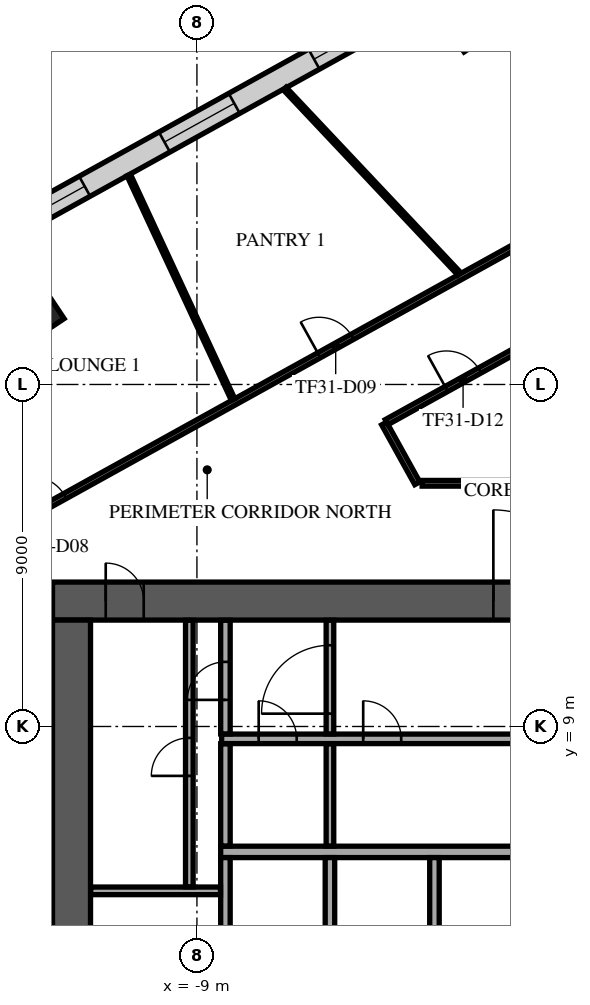
"""IFC4 building model, lengths in metres.
Left out: names, types, materials, properties, quantities, classifications, styles, units other than length and angle.
Written with IfcOpenShell. Run it as: python <this file> out.ifc"""

import sys

from ifc_helpers import new_model, si_unit, direction, frame, frame_2d, origin, origin_2d, place, context, subcontext, project, spatial, rectangle, extrude, element, fill, save


model = new_model("IFC4")
c1 = context("Model", 3, precision=1e-05, world=origin(), true_north=direction((0.0, 1.0)))
c2 = subcontext(c1, "Body", "Model", "MODEL_VIEW")
j1 = project(units=[si_unit("LENGTHUNIT", "METRE"), si_unit("PLANEANGLEUNIT", "RADIAN")], contexts=[c1])
p1 = place(None, origin())
s1 = spatial("IfcSite", under=j1, at=p1, CompositionType="ELEMENT")
p2 = place(p1, origin())
s2 = spatial("IfcBuilding", under=s1, at=p2, CompositionType="ELEMENT")
p3 = place(p2, frame((0.0, 0.0, 135.7)))
s3 = spatial("IfcBuildingStorey", under=s2, at=p3, CompositionType="ELEMENT", Elevation=135.7)
p4 = place(p3, frame((-13.258, 19.885, -0.4), z_axis=(0.0, 0.0, 1.0), x_axis=(0.832028680356, 0.55473261583, 0.0)))
e1 = element("IfcColumn", 1, at=p4, inside=s3, PredefinedType="COLUMN", context=c2, shape_type="SweptSolid", body=[
    extrude(rectangle(XDim=1.1, YDim=1.1, at=origin_2d()), origin(), (0.0, 0.0, 1.0), 4.4),
])
p5 = place(p3, frame((-12.8, 12.3, 0.0), z_axis=(0.0, 0.0, 1.0), x_axis=(1.0, 0.0, 0.0)))
e2 = element("IfcWall", 2, at=p5, inside=s3, PredefinedType="SHEAR", context=c2, shape_type="SweptSolid", body=[
    extrude(rectangle(XDim=25.6, YDim=1.0, at=frame_2d((12.8, 0.0))), origin(), (0.0, 0.0, 1.0), 3.6),
])
p6 = place(p5, frame((11.6, 0.0, 0.0)))
e3 = element("IfcOpeningElement", 3, at=p6, cuts=e2, PredefinedType="OPENING", context=c2, shape_type="SweptSolid", body=[
    extrude(rectangle(XDim=2.4, YDim=2.4, at=frame_2d((1.2, 1.2))), frame((0.0, 0.51, 0.0), z_axis=(0.0, -1.0, 0.0), x_axis=(1.0, 0.0, 0.0)), (0.0, 0.0, 1.0), 1.02),
])
p7 = place(p5, frame((22.425, 0.0, 0.0)))
e4 = element("IfcOpeningElement", 4, at=p7, cuts=e2, PredefinedType="OPENING", context=c2, shape_type="SweptSolid", body=[
    extrude(rectangle(XDim=1.2, YDim=2.1, at=frame_2d((0.6, 1.05))), frame((0.0, 0.51, 0.0), z_axis=(0.0, -1.0, 0.0), x_axis=(1.0, 0.0, 0.0)), (0.0, 0.0, 1.0), 1.02),
])
p8 = place(p5, frame((1.4, 0.0, 0.0)))
e5 = element("IfcOpeningElement", 5, at=p8, cuts=e2, PredefinedType="OPENING", context=c2, shape_type="SweptSolid", body=[
    extrude(rectangle(XDim=1.0, YDim=2.1, at=frame_2d((0.5, 1.05))), frame((0.0, 0.51, 0.0), z_axis=(0.0, -1.0, 0.0), x_axis=(1.0, 0.0, 0.0)), (0.0, 0.0, 1.0), 1.02),
])
p9 = place(p3, frame((-12.3, -11.8, 0.0), z_axis=(0.0, 0.0, 1.0), x_axis=(0.0, 1.0, 0.0)))
e6 = element("IfcWall", 6, at=p9, inside=s3, PredefinedType="SHEAR", context=c2, shape_type="SweptSolid", body=[
    extrude(rectangle(XDim=23.6, YDim=1.0, at=frame_2d((11.8, 0.0))), origin(), (0.0, 0.0, 1.0), 3.6),
])
p10 = place(p9, frame((10.6, 0.0, 0.0)))
e7 = element("IfcOpeningElement", 7, at=p10, cuts=e6, PredefinedType="OPENING", context=c2, shape_type="SweptSolid", body=[
    extrude(rectangle(XDim=2.4, YDim=2.4, at=frame_2d((1.2, 1.2))), frame((0.0, 0.51, 0.0), z_axis=(0.0, -1.0, 0.0), x_axis=(1.0, 0.0, 0.0)), (0.0, 0.0, 1.0), 1.02),
])
p11 = place(p3, frame((-8.375, 5.7, 0.0), z_axis=(0.0, 0.0, 1.0), x_axis=(1.0, 0.0, 0.0)))
e8 = element("IfcWall", 8, at=p11, inside=s3, PredefinedType="SOLIDWALL", context=c2, shape_type="SweptSolid", body=[
    extrude(rectangle(XDim=16.75, YDim=0.3, at=frame_2d((8.375, 0.0))), origin(), (0.0, 0.0, 1.0), 3.6),
])
for number, where, z_axis, x_axis in (
    (9, (-8.25, 2.85, 0.0), (0.0, 0.0, 1.0), (0.0, 1.0, 0.0)),
    (10, (-5.5, 2.85, 0.0), (0.0, 0.0, 1.0), (0.0, 1.0, 0.0)),
    (11, (-2.75, 2.85, 0.0), (0.0, 0.0, 1.0), (0.0, 1.0, 0.0)),
):
    element("IfcWall", number, at=place(p3, frame(where, z_axis=z_axis, x_axis=x_axis)), inside=s3, PredefinedType="SOLIDWALL", context=c2, shape_type="SweptSolid", body=[
        extrude(rectangle(XDim=2.7, YDim=0.25, at=frame_2d((1.35, 0.0))), origin(), (0.0, 0.0, 1.0), 3.6),
    ])
p12 = place(p3, frame((-11.795, 4.675, 0.0), z_axis=(0.0, 0.0, 1.0), x_axis=(1.0, 0.0, 0.0)))
e12 = element("IfcWall", 12, at=p12, inside=s3, PredefinedType="PARTITIONING", context=c2, shape_type="SweptSolid", body=[
    extrude(rectangle(XDim=3.415, YDim=0.2, at=frame_2d((1.708, 0.0))), origin(), (0.0, 0.0, 1.0), 3.6),
])
p13 = place(p3, frame((-9.2, 4.78, 0.0), z_axis=(0.0, 0.0, 1.0), x_axis=(0.0, 1.0, 0.0)))
e13 = element("IfcWall", 13, at=p13, inside=s3, PredefinedType="PARTITIONING", context=c2, shape_type="SweptSolid", body=[
    extrude(rectangle(XDim=7.015, YDim=0.2, at=frame_2d((3.507, 0.0))), origin(), (0.0, 0.0, 1.0), 3.6),
])
p14 = place(p13, frame((2.92, 0.0, 0.0)))
e14 = element("IfcOpeningElement", 14, at=p14, cuts=e13, PredefinedType="OPENING", context=c2, shape_type="SweptSolid", body=[
    extrude(rectangle(XDim=1.0, YDim=2.1, at=frame_2d((0.5, 1.05))), frame((0.0, 0.11, 0.0), z_axis=(0.0, -1.0, 0.0), x_axis=(1.0, 0.0, 0.0)), (0.0, 0.0, 1.0), 0.22),
])
p15 = place(p3, frame((-8.25, 5.855, 0.0), z_axis=(0.0, 0.0, 1.0), x_axis=(0.0, 1.0, 0.0)))
e15 = element("IfcWall", 15, at=p15, inside=s3, PredefinedType="PARTITIONING", context=c2, shape_type="SweptSolid", body=[
    extrude(rectangle(XDim=2.69, YDim=0.25, at=frame_2d((1.345, 0.0))), origin(), (0.0, 0.0, 1.0), 3.6),
])
p16 = place(p3, frame((-5.5, 5.855, 0.0), z_axis=(0.0, 0.0, 1.0), x_axis=(0.0, 1.0, 0.0)))
e16 = element("IfcWall", 16, at=p16, inside=s3, PredefinedType="PARTITIONING", context=c2, shape_type="SweptSolid", body=[
    extrude(rectangle(XDim=2.69, YDim=0.2, at=frame_2d((1.345, 0.0))), origin(), (0.0, 0.0, 1.0), 3.6),
])
p17 = place(p3, frame((-8.35, 8.675, 0.0), z_axis=(0.0, 0.0, 1.0), x_axis=(1.0, 0.0, 0.0)))
e17 = element("IfcWall", 17, at=p17, inside=s3, PredefinedType="PARTITIONING", context=c2, shape_type="SweptSolid", body=[
    extrude(rectangle(XDim=16.72, YDim=0.25, at=frame_2d((8.36, 0.0))), origin(), (0.0, 0.0, 1.0), 3.6),
])
p18 = place(p17, frame((0.975, 0.0, 0.0)))
e18 = element("IfcOpeningElement", 18, at=p18, cuts=e17, PredefinedType="OPENING", context=c2, shape_type="SweptSolid", body=[
    extrude(rectangle(XDim=1.0, YDim=2.1, at=frame_2d((0.5, 1.05))), frame((0.0, 0.135, 0.0), z_axis=(0.0, -1.0, 0.0), x_axis=(1.0, 0.0, 0.0)), (0.0, 0.0, 1.0), 0.27),
])
p19 = place(p17, frame((3.725, 0.0, 0.0)))
e19 = element("IfcOpeningElement", 19, at=p19, cuts=e17, PredefinedType="OPENING", context=c2, shape_type="SweptSolid", body=[
    extrude(rectangle(XDim=1.0, YDim=2.1, at=frame_2d((0.5, 1.05))), frame((0.0, 0.135, 0.0), z_axis=(0.0, -1.0, 0.0), x_axis=(1.0, 0.0, 0.0)), (0.0, 0.0, 1.0), 0.27),
])
p20 = place(p17, frame((9.125, 0.0, 0.0)))
e20 = element("IfcOpeningElement", 20, at=p20, cuts=e17, PredefinedType="OPENING", context=c2, shape_type="SweptSolid", body=[
    extrude(rectangle(XDim=1.2, YDim=2.1, at=frame_2d((0.6, 1.05))), frame((0.0, 0.135, 0.0), z_axis=(0.0, -1.0, 0.0), x_axis=(1.0, 0.0, 0.0)), (0.0, 0.0, 1.0), 0.27),
])
p21 = place(p3, frame((-8.25, 8.805, 0.0), z_axis=(0.0, 0.0, 1.0), x_axis=(0.0, 1.0, 0.0)))
e21 = element("IfcWall", 21, at=p21, inside=s3, PredefinedType="PARTITIONING", context=c2, shape_type="SweptSolid", body=[
    extrude(rectangle(XDim=2.99, YDim=0.25, at=frame_2d((1.495, 0.0))), origin(), (0.0, 0.0, 1.0), 3.6),
])
p22 = place(p21, frame((0.895, 0.0, 0.0)))
e22 = element("IfcOpeningElement", 22, at=p22, cuts=e21, PredefinedType="OPENING", context=c2, shape_type="SweptSolid", body=[
    extrude(rectangle(XDim=1.0, YDim=2.1, at=frame_2d((0.5, 1.05))), frame((0.0, 0.135, 0.0), z_axis=(0.0, -1.0, 0.0), x_axis=(1.0, 0.0, 0.0)), (0.0, 0.0, 1.0), 0.27),
])
p23 = place(p3, frame((-5.5, 8.805, 0.0), z_axis=(0.0, 0.0, 1.0), x_axis=(0.0, 1.0, 0.0)))
e23 = element("IfcWall", 23, at=p23, inside=s3, PredefinedType="PARTITIONING", context=c2, shape_type="SweptSolid", body=[
    extrude(rectangle(XDim=2.99, YDim=0.2, at=frame_2d((1.495, 0.0))), origin(), (0.0, 0.0, 1.0), 3.6),
])
p24 = place(p23, frame((0.532, 0.0, 0.0)))
e24 = element("IfcOpeningElement", 24, at=p24, cuts=e23, PredefinedType="OPENING", context=c2, shape_type="SweptSolid", body=[
    extrude(rectangle(XDim=1.8, YDim=2.1, at=frame_2d((0.9, 1.05))), frame((0.0, 0.11, 0.0), z_axis=(0.0, -1.0, 0.0), x_axis=(1.0, 0.0, 0.0)), (0.0, 0.0, 1.0), 0.22),
])
p25 = place(p3, frame((8.775, 34.705, 0.0), z_axis=(0.0, 0.0, 1.0), x_axis=(-0.874620778241, -0.484807687922, 0.0)))
e25 = element("IfcWall", 25, at=p25, inside=s3, PredefinedType="STANDARD", context=c2, shape_type="SweptSolid", body=[
    extrude(rectangle(XDim=49.376, YDim=0.6, at=frame_2d((24.688, 0.0))), origin(), (0.0, 0.0, 1.0), 3.6),
])
p26 = place(p25, frame((1.2, 0.0, 0.9)))
e26 = element("IfcOpeningElement", 26, at=p26, cuts=e25, PredefinedType="OPENING", context=c2, shape_type="SweptSolid", body=[
    extrude(rectangle(XDim=2.1, YDim=2.1, at=frame_2d((1.05, 1.05))), frame((0.0, 0.31, 0.0), z_axis=(0.0, -1.0, 0.0), x_axis=(1.0, 0.0, 0.0)), (0.0, 0.0, 1.0), 0.62),
])
p27 = place(p25, frame((5.7, 0.0, 0.9)))
e27 = element("IfcOpeningElement", 27, at=p27, cuts=e25, PredefinedType="OPENING", context=c2, shape_type="SweptSolid", body=[
    extrude(rectangle(XDim=2.1, YDim=2.1, at=frame_2d((1.05, 1.05))), frame((0.0, 0.31, 0.0), z_axis=(0.0, -1.0, 0.0), x_axis=(1.0, 0.0, 0.0)), (0.0, 0.0, 1.0), 0.62),
])
p28 = place(p25, frame((14.7, 0.0, 0.9)))
e28 = element("IfcOpeningElement", 28, at=p28, cuts=e25, PredefinedType="OPENING", context=c2, shape_type="SweptSolid", body=[
    extrude(rectangle(XDim=2.1, YDim=2.1, at=frame_2d((1.05, 1.05))), frame((0.0, 0.31, 0.0), z_axis=(0.0, -1.0, 0.0), x_axis=(1.0, 0.0, 0.0)), (0.0, 0.0, 1.0), 0.62),
])
p29 = place(p25, frame((19.2, 0.0, 0.9)))
e29 = element("IfcOpeningElement", 29, at=p29, cuts=e25, PredefinedType="OPENING", context=c2, shape_type="SweptSolid", body=[
    extrude(rectangle(XDim=2.1, YDim=2.1, at=frame_2d((1.05, 1.05))), frame((0.0, 0.31, 0.0), z_axis=(0.0, -1.0, 0.0), x_axis=(1.0, 0.0, 0.0)), (0.0, 0.0, 1.0), 0.62),
])
p30 = place(p25, frame((23.7, 0.0, 0.9)))
e30 = element("IfcOpeningElement", 30, at=p30, cuts=e25, PredefinedType="OPENING", context=c2, shape_type="SweptSolid", body=[
    extrude(rectangle(XDim=2.1, YDim=2.1, at=frame_2d((1.05, 1.05))), frame((0.0, 0.31, 0.0), z_axis=(0.0, -1.0, 0.0), x_axis=(1.0, 0.0, 0.0)), (0.0, 0.0, 1.0), 0.62),
])
p31 = place(p25, frame((28.2, 0.0, 0.9)))
e31 = element("IfcOpeningElement", 31, at=p31, cuts=e25, PredefinedType="OPENING", context=c2, shape_type="SweptSolid", body=[
    extrude(rectangle(XDim=2.1, YDim=2.1, at=frame_2d((1.05, 1.05))), frame((0.0, 0.31, 0.0), z_axis=(0.0, -1.0, 0.0), x_axis=(1.0, 0.0, 0.0)), (0.0, 0.0, 1.0), 0.62),
])
p32 = place(p25, frame((32.7, 0.0, 0.9)))
e32 = element("IfcOpeningElement", 32, at=p32, cuts=e25, PredefinedType="OPENING", context=c2, shape_type="SweptSolid", body=[
    extrude(rectangle(XDim=2.1, YDim=2.1, at=frame_2d((1.05, 1.05))), frame((0.0, 0.31, 0.0), z_axis=(0.0, -1.0, 0.0), x_axis=(1.0, 0.0, 0.0)), (0.0, 0.0, 1.0), 0.62),
])
p33 = place(p25, frame((37.2, 0.0, 0.9)))
e33 = element("IfcOpeningElement", 33, at=p33, cuts=e25, PredefinedType="OPENING", context=c2, shape_type="SweptSolid", body=[
    extrude(rectangle(XDim=2.1, YDim=2.1, at=frame_2d((1.05, 1.05))), frame((0.0, 0.31, 0.0), z_axis=(0.0, -1.0, 0.0), x_axis=(1.0, 0.0, 0.0)), (0.0, 0.0, 1.0), 0.62),
])
p34 = place(p25, frame((41.7, 0.0, 0.9)))
e34 = element("IfcOpeningElement", 34, at=p34, cuts=e25, PredefinedType="OPENING", context=c2, shape_type="SweptSolid", body=[
    extrude(rectangle(XDim=2.1, YDim=2.1, at=frame_2d((1.05, 1.05))), frame((0.0, 0.31, 0.0), z_axis=(0.0, -1.0, 0.0), x_axis=(1.0, 0.0, 0.0)), (0.0, 0.0, 1.0), 0.62),
])
p35 = place(p25, frame((46.138, 0.0, 0.9)))
e35 = element("IfcOpeningElement", 35, at=p35, cuts=e25, PredefinedType="OPENING", context=c2, shape_type="SweptSolid", body=[
    extrude(rectangle(XDim=2.1, YDim=2.1, at=frame_2d((1.05, 1.05))), frame((0.0, 0.31, 0.0), z_axis=(0.0, -1.0, 0.0), x_axis=(1.0, 0.0, 0.0)), (0.0, 0.0, 1.0), 0.62),
])
p36 = place(p3, frame((-23.187, 9.123, 0.0), z_axis=(0.0, 0.0, 1.0), x_axis=(0.874618419846, 0.484811942578, 0.0)))
e36 = element("IfcWall", 36, at=p36, inside=s3, PredefinedType="PARTITIONING", context=c2, shape_type="SweptSolid", body=[
    extrude(rectangle(XDim=31.713, YDim=0.15, at=frame_2d((15.857, 0.0))), origin(), (0.0, 0.0, 1.0), 3.15),
])
p37 = place(p36, frame((11.252, 0.0, 0.0)))
e37 = element("IfcOpeningElement", 37, at=p37, cuts=e36, PredefinedType="OPENING", context=c2, shape_type="SweptSolid", body=[
    extrude(rectangle(XDim=1.0, YDim=2.1, at=frame_2d((0.5, 1.05))), frame((0.0, 0.085, 0.0), z_axis=(0.0, -1.0, 0.0), x_axis=(1.0, 0.0, 0.0)), (0.0, 0.0, 1.0), 0.17),
])
p38 = place(p36, frame((19.896, 0.0, 0.0)))
e38 = element("IfcOpeningElement", 38, at=p38, cuts=e36, PredefinedType="OPENING", context=c2, shape_type="SweptSolid", body=[
    extrude(rectangle(XDim=1.0, YDim=2.1, at=frame_2d((0.5, 1.05))), frame((0.0, 0.085, 0.0), z_axis=(0.0, -1.0, 0.0), x_axis=(1.0, 0.0, 0.0)), (0.0, 0.0, 1.0), 0.17),
])
p39 = place(p36, frame((29.223, 0.0, 0.0)))
e39 = element("IfcOpeningElement", 39, at=p39, cuts=e36, PredefinedType="OPENING", context=c2, shape_type="SweptSolid", body=[
    extrude(rectangle(XDim=1.0, YDim=2.1, at=frame_2d((0.5, 1.05))), frame((0.0, 0.085, 0.0), z_axis=(0.0, -1.0, 0.0), x_axis=(1.0, 0.0, 0.0)), (0.0, 0.0, 1.0), 0.17),
])
p40 = place(p3, frame((-4.074, 16.973, 0.0), z_axis=(0.0, 0.0, 1.0), x_axis=(0.484870548803, -0.874585931114, 0.0)))
e40 = element("IfcWall", 40, at=p40, inside=s3, PredefinedType="PARTITIONING", context=c2, shape_type="SweptSolid", body=[
    extrude(rectangle(XDim=1.799, YDim=0.15, at=frame_2d((0.899, 0.0))), origin(), (0.0, 0.0, 1.0), 3.6),
])
p41 = place(p3, frame((-4.008, 17.01, 0.0), z_axis=(0.0, 0.0, 1.0), x_axis=(0.874611645774, 0.484824163049, 0.0)))
e41 = element("IfcWall", 41, at=p41, inside=s3, PredefinedType="PARTITIONING", context=c2, shape_type="SweptSolid", body=[
    extrude(rectangle(XDim=11.041, YDim=0.15, at=frame_2d((5.521, 0.0))), origin(), (0.0, 0.0, 1.0), 3.15),
])
p42 = place(p41, frame((1.8, 0.0, 0.0)))
e42 = element("IfcOpeningElement", 42, at=p42, cuts=e41, PredefinedType="OPENING", context=c2, shape_type="SweptSolid", body=[
    extrude(rectangle(XDim=1.0, YDim=2.1, at=frame_2d((0.5, 1.05))), frame((0.0, 0.085, 0.0), z_axis=(0.0, -1.0, 0.0), x_axis=(1.0, 0.0, 0.0)), (0.0, 0.0, 1.0), 0.17),
])
p43 = place(p3, frame((-3.075, 15.4, 0.0), z_axis=(0.0, 0.0, 1.0), x_axis=(1.0, 0.0, 0.0)))
e43 = element("IfcWall", 43, at=p43, inside=s3, PredefinedType="PARTITIONING", context=c2, shape_type="SweptSolid", body=[
    extrude(rectangle(XDim=17.886, YDim=0.15, at=frame_2d((8.943, 0.0))), origin(), (0.0, 0.0, 1.0), 3.15),
])
p44 = place(p43, frame((10.17, 0.0, 0.0)))
e44 = element("IfcOpeningElement", 44, at=p44, cuts=e43, PredefinedType="OPENING", context=c2, shape_type="SweptSolid", body=[
    extrude(rectangle(XDim=1.8, YDim=2.1, at=frame_2d((0.9, 1.05))), frame((0.0, 0.085, 0.0), z_axis=(0.0, -1.0, 0.0), x_axis=(1.0, 0.0, 0.0)), (0.0, 0.0, 1.0), 0.17),
])
p45 = place(p3, frame((-10.795, 23.513, 0.0), z_axis=(0.0, 0.0, 1.0), x_axis=(0.42134027537, -0.906902625617, 0.0)))
e45 = element("IfcWall", 45, at=p45, inside=s3, PredefinedType="PARTITIONING", context=c2, shape_type="SweptSolid", body=[
    extrude(rectangle(XDim=6.516, YDim=0.1, at=frame_2d((3.258, 0.0))), origin(), (0.0, 0.0, 1.0), 3.15),
])
p46 = place(p3, frame((-6.691, 25.788, 0.0), z_axis=(0.0, 0.0, 1.0), x_axis=(0.685723912774, -0.727861741988, 0.0)))
e46 = element("IfcWall", 46, at=p46, inside=s3, PredefinedType="PARTITIONING", context=c2, shape_type="SweptSolid", body=[
    extrude(rectangle(XDim=6.698, YDim=0.1, at=frame_2d((3.349, 0.0))), origin(), (0.0, 0.0, 1.0), 3.15),
])
p47 = place(p6, origin())
e47 = element("IfcDoor", 47, at=p47, inside=s3, OperationType="SINGLE_SWING_LEFT", PredefinedType="DOOR", context=c2, shape_type="SweptSolid", body=[
    extrude(rectangle(XDim=2.4, YDim=2.4, at=frame_2d((1.2, 1.2))), frame((0.0, 0.025, 0.0), z_axis=(0.0, -1.0, 0.0), x_axis=(1.0, 0.0, 0.0)), (0.0, 0.0, 1.0), 0.05),
])
fill(e3, e47)
p48 = place(p8, origin())
e48 = element("IfcDoor", 48, at=p48, inside=s3, OperationType="SINGLE_SWING_LEFT", PredefinedType="DOOR", context=c2, shape_type="SweptSolid", body=[
    extrude(rectangle(XDim=1.0, YDim=2.1, at=frame_2d((0.5, 1.05))), frame((0.0, 0.025, 0.0), z_axis=(0.0, -1.0, 0.0), x_axis=(1.0, 0.0, 0.0)), (0.0, 0.0, 1.0), 0.05),
])
fill(e5, e48)
p49 = place(p14, origin())
e49 = element("IfcDoor", 49, at=p49, inside=s3, OperationType="SINGLE_SWING_RIGHT", PredefinedType="DOOR", context=c2, shape_type="SweptSolid", body=[
    extrude(rectangle(XDim=1.0, YDim=2.1, at=frame_2d((0.5, 1.05))), frame((0.0, 0.025, 0.0), z_axis=(0.0, -1.0, 0.0), x_axis=(1.0, 0.0, 0.0)), (0.0, 0.0, 1.0), 0.05),
])
fill(e14, e49)
p50 = place(p22, origin())
e50 = element("IfcDoor", 50, at=p50, inside=s3, OperationType="SINGLE_SWING_RIGHT", PredefinedType="DOOR", context=c2, shape_type="SweptSolid", body=[
    extrude(rectangle(XDim=1.0, YDim=2.1, at=frame_2d((0.5, 1.05))), frame((0.0, 0.025, 0.0), z_axis=(0.0, -1.0, 0.0), x_axis=(1.0, 0.0, 0.0)), (0.0, 0.0, 1.0), 0.05),
])
fill(e22, e50)
p51 = place(p18, origin())
e51 = element("IfcDoor", 51, at=p51, inside=s3, OperationType="SINGLE_SWING_RIGHT", PredefinedType="DOOR", context=c2, shape_type="SweptSolid", body=[
    extrude(rectangle(XDim=1.0, YDim=2.1, at=frame_2d((0.5, 1.05))), frame((0.0, 0.025, 0.0), z_axis=(0.0, -1.0, 0.0), x_axis=(1.0, 0.0, 0.0)), (0.0, 0.0, 1.0), 0.05),
])
fill(e18, e51)
p52 = place(p19, origin())
e52 = element("IfcDoor", 52, at=p52, inside=s3, OperationType="SINGLE_SWING_RIGHT", PredefinedType="DOOR", context=c2, shape_type="SweptSolid", body=[
    extrude(rectangle(XDim=1.0, YDim=2.1, at=frame_2d((0.5, 1.05))), frame((0.0, 0.025, 0.0), z_axis=(0.0, -1.0, 0.0), x_axis=(1.0, 0.0, 0.0)), (0.0, 0.0, 1.0), 0.05),
])
fill(e19, e52)
p53 = place(p24, origin())
e53 = element("IfcDoor", 53, at=p53, inside=s3, OperationType="SINGLE_SWING_LEFT", PredefinedType="DOOR", context=c2, shape_type="SweptSolid", body=[
    extrude(rectangle(XDim=1.8, YDim=2.1, at=frame_2d((0.9, 1.05))), frame((0.0, 0.025, 0.0), z_axis=(0.0, -1.0, 0.0), x_axis=(1.0, 0.0, 0.0)), (0.0, 0.0, 1.0), 0.05),
])
fill(e24, e53)
p54 = place(p28, origin())
e54 = element("IfcWindow", 54, at=p54, inside=s3, PartitioningType="SINGLE_PANEL", PredefinedType="WINDOW", context=c2, shape_type="SweptSolid", body=[
    extrude(rectangle(XDim=2.1, YDim=2.1, at=frame_2d((1.05, 1.05))), frame((0.0, 0.03, 0.0), z_axis=(0.0, -1.0, 0.0), x_axis=(1.0, 0.0, 0.0)), (0.0, 0.0, 1.0), 0.06),
])
fill(e28, e54)
p55 = place(p29, origin())
e55 = element("IfcWindow", 55, at=p55, inside=s3, PartitioningType="SINGLE_PANEL", PredefinedType="WINDOW", context=c2, shape_type="SweptSolid", body=[
    extrude(rectangle(XDim=2.1, YDim=2.1, at=frame_2d((1.05, 1.05))), frame((0.0, 0.03, 0.0), z_axis=(0.0, -1.0, 0.0), x_axis=(1.0, 0.0, 0.0)), (0.0, 0.0, 1.0), 0.06),
])
fill(e29, e55)
p56 = place(p30, origin())
e56 = element("IfcWindow", 56, at=p56, inside=s3, PartitioningType="SINGLE_PANEL", PredefinedType="WINDOW", context=c2, shape_type="SweptSolid", body=[
    extrude(rectangle(XDim=2.1, YDim=2.1, at=frame_2d((1.05, 1.05))), frame((0.0, 0.03, 0.0), z_axis=(0.0, -1.0, 0.0), x_axis=(1.0, 0.0, 0.0)), (0.0, 0.0, 1.0), 0.06),
])
fill(e30, e56)
p57 = place(p37, origin())
e57 = element("IfcDoor", 57, at=p57, inside=s3, OperationType="SINGLE_SWING_RIGHT", PredefinedType="DOOR", context=c2, shape_type="SweptSolid", body=[
    extrude(rectangle(XDim=1.0, YDim=2.1, at=frame_2d((0.5, 1.05))), frame((0.0, 0.025, 0.0), z_axis=(0.0, -1.0, 0.0), x_axis=(1.0, 0.0, 0.0)), (0.0, 0.0, 1.0), 0.05),
])
fill(e37, e57)
p58 = place(p38, origin())
e58 = element("IfcDoor", 58, at=p58, inside=s3, OperationType="SINGLE_SWING_LEFT", PredefinedType="DOOR", context=c2, shape_type="SweptSolid", body=[
    extrude(rectangle(XDim=1.0, YDim=2.1, at=frame_2d((0.5, 1.05))), frame((0.0, 0.025, 0.0), z_axis=(0.0, -1.0, 0.0), x_axis=(1.0, 0.0, 0.0)), (0.0, 0.0, 1.0), 0.05),
])
fill(e38, e58)
p59 = place(p42, frame((1.0, 0.0, 0.0), z_axis=(0.0, 0.0, 1.0), x_axis=(-1.0, 0.0, 0.0)))
e59 = element("IfcDoor", 59, at=p59, inside=s3, OperationType="SINGLE_SWING_RIGHT", PredefinedType="DOOR", context=c2, shape_type="SweptSolid", body=[
    extrude(rectangle(XDim=1.0, YDim=2.1, at=frame_2d((0.5, 1.05))), frame((0.0, 0.025, 0.0), z_axis=(0.0, -1.0, 0.0), x_axis=(1.0, 0.0, 0.0)), (0.0, 0.0, 1.0), 0.05),
])
fill(e42, e59)
save(model, sys.argv[1])
